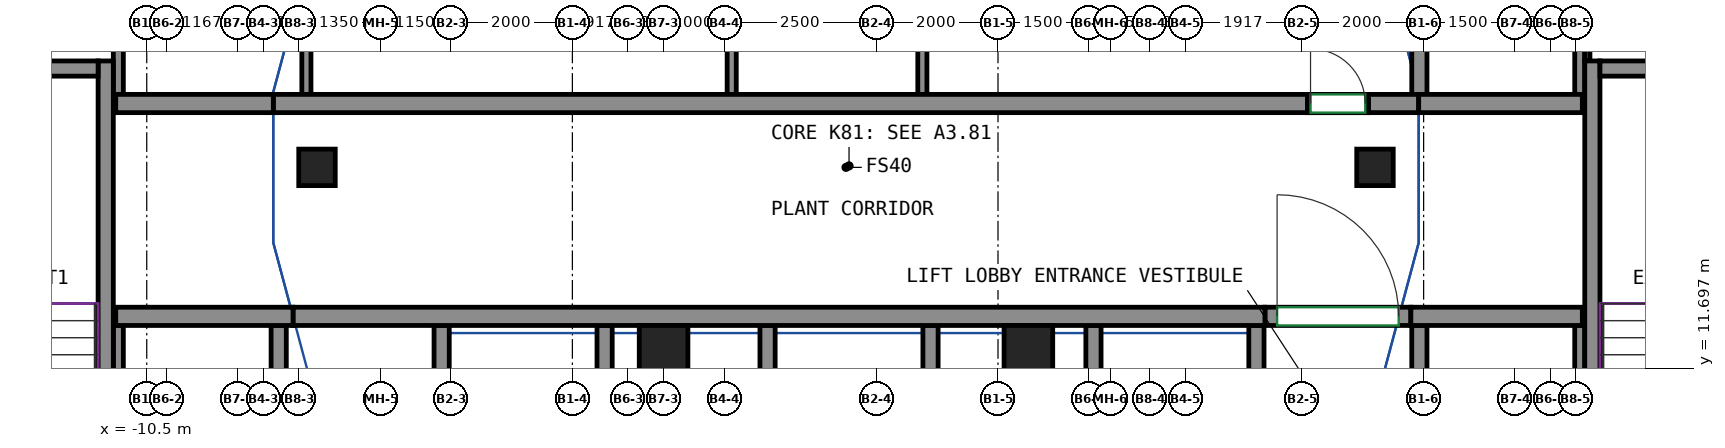
"""IFC4 building model, lengths in metres.
Left out: names, types, materials, properties, quantities, classifications, styles, units other than length and angle.
Written with IfcOpenShell. Run it as: python <this file> out.ifc"""

import sys

from ifc_helpers import new_model, si_unit, direction, frame, frame_2d, origin, origin_2d, place, context, subcontext, project, spatial, rectangle, extrude, source, transform, mapped, element, fill, save


model = new_model("IFC4")
c1 = context("Model", 3, precision=1e-05, world=origin(), true_north=direction((0.0, 1.0)))
c2 = subcontext(c1, "Body", "Model", "MODEL_VIEW")
j1 = project(units=[si_unit("LENGTHUNIT", "METRE"), si_unit("PLANEANGLEUNIT", "RADIAN")], contexts=[c1])
p1 = place(None, origin())
s1 = spatial("IfcSite", under=j1, at=p1, CompositionType="ELEMENT")
p2 = place(p1, origin())
s2 = spatial("IfcBuilding", under=s1, at=p2, CompositionType="ELEMENT")
p3 = place(p2, frame((0.0, 0.0, 318.8)))
s3 = spatial("IfcBuildingStorey", under=s2, at=p3, CompositionType="ELEMENT", Elevation=318.8)
m1 = source(origin(), c2, "Body", "SweptSolid", [
    extrude(rectangle(XDim=0.6, YDim=0.6, at=origin_2d()), origin(), (0.0, 0.0, 1.0), 4.6),
])
for number, where, z_axis, x_axis in (
    (1, (9.7, 15.0, 0.0), (0.0, 0.0, 1.0), (1.0, 0.0, 0.0)),
    (2, (-7.7, 15.0, 0.0), (0.0, 0.0, 1.0), (1.0, 0.0, 0.0)),
):
    element("IfcColumn", number, at=place(p3, frame(where, z_axis=z_axis, x_axis=x_axis)), inside=s3, PredefinedType="COLUMN", context=c2, shape_type="MappedRepresentation", body=[
        mapped(m1, transform((0.0, 0.0, 0.0))),
    ])
m2 = source(origin(), c2, "Body", "SweptSolid", [
    extrude(rectangle(XDim=0.8, YDim=0.8, at=origin_2d()), origin(), (0.0, 0.0, 1.0), 4.6),
])
for number, where, z_axis, x_axis in (
    (3, (-2.0, 12.0, 0.0), (0.0, 0.0, 1.0), (1.0, 0.0, 0.0)),
    (4, (4.0, 12.0, 0.0), (0.0, 0.0, 1.0), (1.0, 0.0, 0.0)),
):
    element("IfcColumn", number, at=place(p3, frame(where, z_axis=z_axis, x_axis=x_axis)), inside=s3, PredefinedType="COLUMN", context=c2, shape_type="MappedRepresentation", body=[
        mapped(m2, transform((0.0, 0.0, 0.0))),
    ])
m3 = source(origin(), c2, "Body", "SweptSolid", [
    extrude(rectangle(XDim=7.75, YDim=0.25, at=frame_2d((3.875, 0.0))), origin(), (0.0, 0.0, 1.0), 5.0),
])
p4 = place(p3, frame((-11.175, 9.0, -0.4), z_axis=(0.0, 0.0, 1.0), x_axis=(0.0, 1.0, 0.0)))
e5 = element("IfcWall", 5, at=p4, inside=s3, PredefinedType="SHEAR", context=c2, shape_type="MappedRepresentation", body=[
    mapped(m3, transform((0.0, 0.0, 0.0))),
])
m4 = source(origin(), c2, "Body", "SweptSolid", [
    extrude(rectangle(XDim=3.7, YDim=0.25, at=frame_2d((1.85, 0.0))), origin(), (0.0, 0.0, 1.0), 5.0),
])
p5 = place(p3, frame((-15.0, 16.625, -0.4), z_axis=(0.0, 0.0, 1.0), x_axis=(1.0, 0.0, 0.0)))
e6 = element("IfcWall", 6, at=p5, inside=s3, PredefinedType="SHEAR", context=c2, shape_type="MappedRepresentation", body=[
    mapped(m4, transform((0.0, 0.0, 0.0))),
])
p6 = place(p3, frame((13.275, 9.0, -0.4), z_axis=(0.0, 0.0, 1.0), x_axis=(0.0, 1.0, 0.0)))
e7 = element("IfcWall", 7, at=p6, inside=s3, PredefinedType="SHEAR", context=c2, shape_type="MappedRepresentation", body=[
    mapped(m3, transform((0.0, 0.0, 0.0))),
])
m5 = source(origin(), c2, "Body", "SweptSolid", [
    extrude(rectangle(XDim=3.7, YDim=0.25, at=frame_2d((1.85, 0.0))), origin(), (0.0, 0.0, 1.0), 5.0),
])
p7 = place(p3, frame((13.4, 16.625, -0.4), z_axis=(0.0, 0.0, 1.0), x_axis=(1.0, 0.0, 0.0)))
e8 = element("IfcWall", 8, at=p7, inside=s3, PredefinedType="SHEAR", context=c2, shape_type="MappedRepresentation", body=[
    mapped(m5, transform((0.0, 0.0, 0.0))),
])
m6 = source(origin(), c2, "Body", "SweptSolid", [
    extrude(rectangle(XDim=15.984, YDim=0.3, at=frame_2d((7.992, 0.0))), origin(), (0.0, 0.0, 1.0), 4.6),
])
p8 = place(p3, frame((-8.094, 12.55, 0.0), z_axis=(0.0, 0.0, 1.0), x_axis=(1.0, 0.0, 0.0)))
e9 = element("IfcWall", 9, at=p8, inside=s3, PredefinedType="SHEAR", context=c2, shape_type="MappedRepresentation", body=[
    mapped(m6, transform((0.0, 0.0, 0.0))),
])
m7 = source(origin(), c2, "Body", "SweptSolid", [
    extrude(rectangle(XDim=2.916, YDim=0.3, at=frame_2d((1.458, 0.0))), origin(), (0.0, 0.0, 1.0), 5.0),
])
p9 = place(p3, frame((-11.01, 12.55, -0.4), z_axis=(0.0, 0.0, 1.0), x_axis=(1.0, 0.0, 0.0)))
e10 = element("IfcWall", 10, at=p9, inside=s3, PredefinedType="SHEAR", context=c2, shape_type="MappedRepresentation", body=[
    mapped(m7, transform((0.0, 0.0, 0.0))),
])
m8 = source(origin(), c2, "Body", "SweptSolid", [
    extrude(rectangle(XDim=2.82, YDim=0.3, at=frame_2d((1.41, 0.0))), origin(), (0.0, 0.0, 1.0), 5.0),
])
p10 = place(p3, frame((10.29, 12.55, -0.4), z_axis=(0.0, 0.0, 1.0), x_axis=(1.0, 0.0, 0.0)))
e11 = element("IfcWall", 11, at=p10, inside=s3, PredefinedType="SHEAR", context=c2, shape_type="MappedRepresentation", body=[
    mapped(m8, transform((0.0, 0.0, 0.0))),
])
m9 = source(origin(), c2, "Body", "SweptSolid", [
    extrude(rectangle(XDim=17.009, YDim=0.3, at=frame_2d((8.504, 0.0))), origin(), (0.0, 0.0, 1.0), 4.6),
])
p11 = place(p3, frame((-8.419, 16.05, 0.0), z_axis=(0.0, 0.0, 1.0), x_axis=(1.0, 0.0, 0.0)))
e12 = element("IfcWall", 12, at=p11, inside=s3, PredefinedType="SHEAR", context=c2, shape_type="MappedRepresentation", body=[
    mapped(m9, transform((0.0, 0.0, 0.0))),
])
m10 = source(origin(), c2, "Body", "SweptSolid", [
    extrude(rectangle(XDim=2.591, YDim=0.3, at=frame_2d((1.296, 0.0))), origin(), (0.0, 0.0, 1.0), 5.0),
])
p12 = place(p3, frame((-11.01, 16.05, -0.4), z_axis=(0.0, 0.0, 1.0), x_axis=(1.0, 0.0, 0.0)))
e13 = element("IfcWall", 13, at=p12, inside=s3, PredefinedType="SHEAR", context=c2, shape_type="MappedRepresentation", body=[
    mapped(m10, transform((0.0, 0.0, 0.0))),
])
m11 = source(origin(), c2, "Body", "SweptSolid", [
    extrude(rectangle(XDim=0.829, YDim=0.3, at=frame_2d((0.414, 0.0))), origin(), (0.0, 0.0, 1.0), 4.6),
])
p13 = place(p3, frame((9.59, 16.05, 0.0), z_axis=(0.0, 0.0, 1.0), x_axis=(1.0, 0.0, 0.0)))
e14 = element("IfcWall", 14, at=p13, inside=s3, PredefinedType="SHEAR", context=c2, shape_type="MappedRepresentation", body=[
    mapped(m11, transform((0.0, 0.0, 0.0))),
])
m12 = source(origin(), c2, "Body", "SweptSolid", [
    extrude(rectangle(XDim=2.691, YDim=0.3, at=frame_2d((1.346, 0.0))), origin(), (0.0, 0.0, 1.0), 5.0),
])
p14 = place(p3, frame((10.419, 16.05, -0.4), z_axis=(0.0, 0.0, 1.0), x_axis=(1.0, 0.0, 0.0)))
e15 = element("IfcWall", 15, at=p14, inside=s3, PredefinedType="SHEAR", context=c2, shape_type="MappedRepresentation", body=[
    mapped(m12, transform((0.0, 0.0, 0.0))),
])
m13 = source(origin(), c2, "Body", "SweptSolid", [
    extrude(rectangle(XDim=1.0, YDim=0.3, at=frame_2d((0.5, 0.0))), origin(), (0.0, 0.0, 1.0), 1.35),
])
p15 = place(p3, frame((8.59, 16.05, 3.25), z_axis=(0.0, 0.0, 1.0), x_axis=(1.0, 0.0, 0.0)))
e16 = element("IfcWall", 16, at=p15, inside=s3, PredefinedType="SHEAR", context=c2, shape_type="MappedRepresentation", body=[
    mapped(m13, transform((0.0, 0.0, 0.0))),
])
m14 = source(origin(), c2, "Body", "SweptSolid", [
    extrude(rectangle(XDim=2.4, YDim=0.3, at=frame_2d((1.2, 0.0))), origin(), (0.0, 0.0, 1.0), 4.6),
])
p16 = place(p3, frame((7.89, 12.55, 0.0), z_axis=(0.0, 0.0, 1.0), x_axis=(1.0, 0.0, 0.0)))
e17 = element("IfcWall", 17, at=p16, inside=s3, PredefinedType="PARTITIONING", context=c2, shape_type="MappedRepresentation", body=[
    mapped(m14, transform((0.0, 0.0, 0.0))),
])
p17 = place(p16, frame((0.2, 0.0, 0.0)))
e18 = element("IfcOpeningElement", 18, at=p17, cuts=e17, PredefinedType="OPENING", context=c2, shape_type="SweptSolid", body=[
    extrude(rectangle(XDim=2.0, YDim=2.1, at=frame_2d((1.0, 1.05))), frame((0.0, 0.16, 0.0), z_axis=(0.0, -1.0, 0.0), x_axis=(1.0, 0.0, 0.0)), (0.0, 0.0, 1.0), 0.32),
])
m15 = source(origin(), c2, "Body", "SweptSolid", [
    extrude(rectangle(XDim=3.275, YDim=0.165, at=frame_2d((1.638, 0.0))), origin(), (0.0, 0.0, 1.0), 4.6),
])
p18 = place(p3, frame((13.067, 16.2, 0.0), z_axis=(0.0, 0.0, 1.0), x_axis=(0.0, 1.0, 0.0)))
e19 = element("IfcWall", 19, at=p18, inside=s3, PredefinedType="PARTITIONING", context=c2, shape_type="MappedRepresentation", body=[
    mapped(m15, transform((0.0, 0.0, 0.0))),
])
m16 = source(origin(), c2, "Body", "SweptSolid", [
    extrude(rectangle(XDim=4.8, YDim=0.165, at=frame_2d((2.4, 0.0))), origin(), (0.0, 0.0, 1.0), 4.6),
])
p19 = place(p3, frame((-10.968, 16.2, 0.0), z_axis=(0.0, 0.0, 1.0), x_axis=(0.0, 1.0, 0.0)))
e20 = element("IfcWall", 20, at=p19, inside=s3, PredefinedType="PARTITIONING", context=c2, shape_type="MappedRepresentation", body=[
    mapped(m16, transform((0.0, 0.0, 0.0))),
])
m17 = source(origin(), c2, "Body", "SweptSolid", [
    extrude(rectangle(XDim=3.275, YDim=0.25, at=frame_2d((1.638, 0.0))), origin(), (0.0, 0.0, 1.0), 4.6),
])
p20 = place(p3, frame((10.43, 16.2, 0.0), z_axis=(0.0, 0.0, 1.0), x_axis=(0.0, 1.0, 0.0)))
e21 = element("IfcWall", 21, at=p20, inside=s3, PredefinedType="PARTITIONING", context=c2, shape_type="MappedRepresentation", body=[
    mapped(m17, transform((0.0, 0.0, 0.0))),
])
m18 = source(origin(), c2, "Body", "SweptSolid", [
    extrude(rectangle(XDim=2.725, YDim=0.085, at=frame_2d((1.363, 0.0))), origin(), (0.0, 0.0, 1.0), 4.6),
])
p21 = place(p3, frame((13.192, 16.75, 0.0), z_axis=(0.0, 0.0, 1.0), x_axis=(0.0, 1.0, 0.0)))
e22 = element("IfcWall", 22, at=p21, inside=s3, PredefinedType="PARTITIONING", context=c2, shape_type="MappedRepresentation", body=[
    mapped(m18, transform((0.0, 0.0, 0.0))),
])
m19 = source(origin(), c2, "Body", "SweptSolid", [
    extrude(rectangle(XDim=3.4, YDim=0.25, at=frame_2d((1.7, 0.0))), origin(), (0.0, 0.0, 1.0), 4.6),
])
p22 = place(p3, frame((10.43, 9.0, 0.0), z_axis=(0.0, 0.0, 1.0), x_axis=(0.0, 1.0, 0.0)))
e23 = element("IfcWall", 23, at=p22, inside=s3, PredefinedType="PARTITIONING", context=c2, shape_type="MappedRepresentation", body=[
    mapped(m19, transform((0.0, 0.0, 0.0))),
])
m20 = source(origin(), c2, "Body", "SweptSolid", [
    extrude(rectangle(XDim=3.4, YDim=0.165, at=frame_2d((1.7, 0.0))), origin(), (0.0, 0.0, 1.0), 4.6),
])
p23 = place(p3, frame((13.067, 9.0, 0.0), z_axis=(0.0, 0.0, 1.0), x_axis=(0.0, 1.0, 0.0)))
e24 = element("IfcWall", 24, at=p23, inside=s3, PredefinedType="PARTITIONING", context=c2, shape_type="MappedRepresentation", body=[
    mapped(m20, transform((0.0, 0.0, 0.0))),
])
for number, where, z_axis, x_axis in (
    (25, (2.39, 9.0, 0.0), (0.0, 0.0, 1.0), (0.0, 1.0, 0.0)),
    (26, (5.07, 9.0, 0.0), (0.0, 0.0, 1.0), (0.0, 1.0, 0.0)),
    (27, (7.75, 9.0, 0.0), (0.0, 0.0, 1.0), (0.0, 1.0, 0.0)),
    (28, (-0.29, 9.0, 0.0), (0.0, 0.0, 1.0), (0.0, 1.0, 0.0)),
):
    element("IfcWall", number, at=place(p3, frame(where, z_axis=z_axis, x_axis=x_axis)), inside=s3, PredefinedType="PARTITIONING", context=c2, shape_type="MappedRepresentation", body=[
        mapped(m19, transform((0.0, 0.0, 0.0))),
    ])
p24 = place(p3, frame((-10.968, 9.0, 0.0), z_axis=(0.0, 0.0, 1.0), x_axis=(0.0, 1.0, 0.0)))
e29 = element("IfcWall", 29, at=p24, inside=s3, PredefinedType="PARTITIONING", context=c2, shape_type="MappedRepresentation", body=[
    mapped(m20, transform((0.0, 0.0, 0.0))),
])
for number, where, z_axis, x_axis in (
    (30, (-2.97, 9.0, 0.0), (0.0, 0.0, 1.0), (0.0, 1.0, 0.0)),
    (31, (-5.65, 9.0, 0.0), (0.0, 0.0, 1.0), (0.0, 1.0, 0.0)),
    (32, (-8.33, 9.0, 0.0), (0.0, 0.0, 1.0), (0.0, 1.0, 0.0)),
):
    element("IfcWall", number, at=place(p3, frame(where, z_axis=z_axis, x_axis=x_axis)), inside=s3, PredefinedType="PARTITIONING", context=c2, shape_type="MappedRepresentation", body=[
        mapped(m19, transform((0.0, 0.0, 0.0))),
    ])
m21 = source(origin(), c2, "Body", "SweptSolid", [
    extrude(rectangle(XDim=4.8, YDim=0.15, at=frame_2d((2.4, 0.0))), origin(), (0.0, 0.0, 1.0), 4.6),
])
p25 = place(p3, frame((-7.875, 16.2, 0.0), z_axis=(0.0, 0.0, 1.0), x_axis=(0.0, 1.0, 0.0)))
e33 = element("IfcWall", 33, at=p25, inside=s3, PredefinedType="PARTITIONING", context=c2, shape_type="MappedRepresentation", body=[
    mapped(m21, transform((0.0, 0.0, 0.0))),
])
p26 = place(p25, frame((3.55, 0.0, 0.0)))
e34 = element("IfcOpeningElement", 34, at=p26, cuts=e33, PredefinedType="OPENING", context=c2, shape_type="SweptSolid", body=[
    extrude(rectangle(XDim=0.9, YDim=2.1, at=frame_2d((0.45, 1.05))), frame((0.0, 0.085, 0.0), z_axis=(0.0, -1.0, 0.0), x_axis=(1.0, 0.0, 0.0)), (0.0, 0.0, 1.0), 0.17),
])
p27 = place(p3, frame((-0.88, 16.2, 0.0), z_axis=(0.0, 0.0, 1.0), x_axis=(0.0, 1.0, 0.0)))
e35 = element("IfcWall", 35, at=p27, inside=s3, PredefinedType="PARTITIONING", context=c2, shape_type="MappedRepresentation", body=[
    mapped(m21, transform((0.0, 0.0, 0.0))),
])
p28 = place(p27, frame((3.55, 0.0, 0.0)))
e36 = element("IfcOpeningElement", 36, at=p28, cuts=e35, PredefinedType="OPENING", context=c2, shape_type="SweptSolid", body=[
    extrude(rectangle(XDim=0.9, YDim=2.1, at=frame_2d((0.45, 1.05))), frame((0.0, 0.085, 0.0), z_axis=(0.0, -1.0, 0.0), x_axis=(1.0, 0.0, 0.0)), (0.0, 0.0, 1.0), 0.17),
])
p29 = place(p3, frame((2.256, 16.2, 0.0), z_axis=(0.0, 0.0, 1.0), x_axis=(0.0, 1.0, 0.0)))
e37 = element("IfcWall", 37, at=p29, inside=s3, PredefinedType="PARTITIONING", context=c2, shape_type="MappedRepresentation", body=[
    mapped(m21, transform((0.0, 0.0, 0.0))),
])
p30 = place(p29, frame((3.55, 0.0, 0.0)))
e38 = element("IfcOpeningElement", 38, at=p30, cuts=e37, PredefinedType="OPENING", context=c2, shape_type="SweptSolid", body=[
    extrude(rectangle(XDim=0.9, YDim=2.1, at=frame_2d((0.45, 1.05))), frame((0.0, 0.085, 0.0), z_axis=(0.0, -1.0, 0.0), x_axis=(1.0, 0.0, 0.0)), (0.0, 0.0, 1.0), 0.17),
])
m22 = source(origin(), c2, "Body", "SweptSolid", [
    extrude(rectangle(XDim=1.0, YDim=0.3, at=frame_2d((0.5, 0.0))), origin(), (0.0, 0.0, 1.0), 2.4),
])
p31 = place(p3, frame((8.59, 16.05, 0.0), z_axis=(0.0, 0.0, 1.0), x_axis=(1.0, 0.0, 0.0)))
e39 = element("IfcWall", 39, at=p31, inside=s3, PredefinedType="PARTITIONING", context=c2, shape_type="MappedRepresentation", body=[
    mapped(m22, transform((0.0, 0.0, 0.0))),
])
p32 = place(p31, frame((0.05, 0.0, 0.0)))
e40 = element("IfcOpeningElement", 40, at=p32, cuts=e39, PredefinedType="OPENING", context=c2, shape_type="SweptSolid", body=[
    extrude(rectangle(XDim=0.9, YDim=2.1, at=frame_2d((0.45, 1.05))), frame((0.0, 0.16, 0.0), z_axis=(0.0, -1.0, 0.0), x_axis=(1.0, 0.0, 0.0)), (0.0, 0.0, 1.0), 0.32),
])
p33 = place(p17, origin())
e41 = element("IfcDoor", 41, at=p33, inside=s3, OperationType="DOUBLE_DOOR_SINGLE_SWING", PredefinedType="DOOR", context=c2, shape_type="SweptSolid", body=[
    extrude(rectangle(XDim=2.0, YDim=2.1, at=frame_2d((1.0, 1.05))), frame((0.0, 0.025, 0.0), z_axis=(0.0, -1.0, 0.0), x_axis=(1.0, 0.0, 0.0)), (0.0, 0.0, 1.0), 0.05),
])
fill(e18, e41)
p34 = place(p32, origin())
e42 = element("IfcDoor", 42, at=p34, inside=s3, OperationType="SINGLE_SWING_LEFT", PredefinedType="DOOR", context=c2, shape_type="SweptSolid", body=[
    extrude(rectangle(XDim=0.9, YDim=2.1, at=frame_2d((0.45, 1.05))), frame((0.0, 0.025, 0.0), z_axis=(0.0, -1.0, 0.0), x_axis=(1.0, 0.0, 0.0)), (0.0, 0.0, 1.0), 0.05),
])
fill(e40, e42)
save(model, sys.argv[1])
